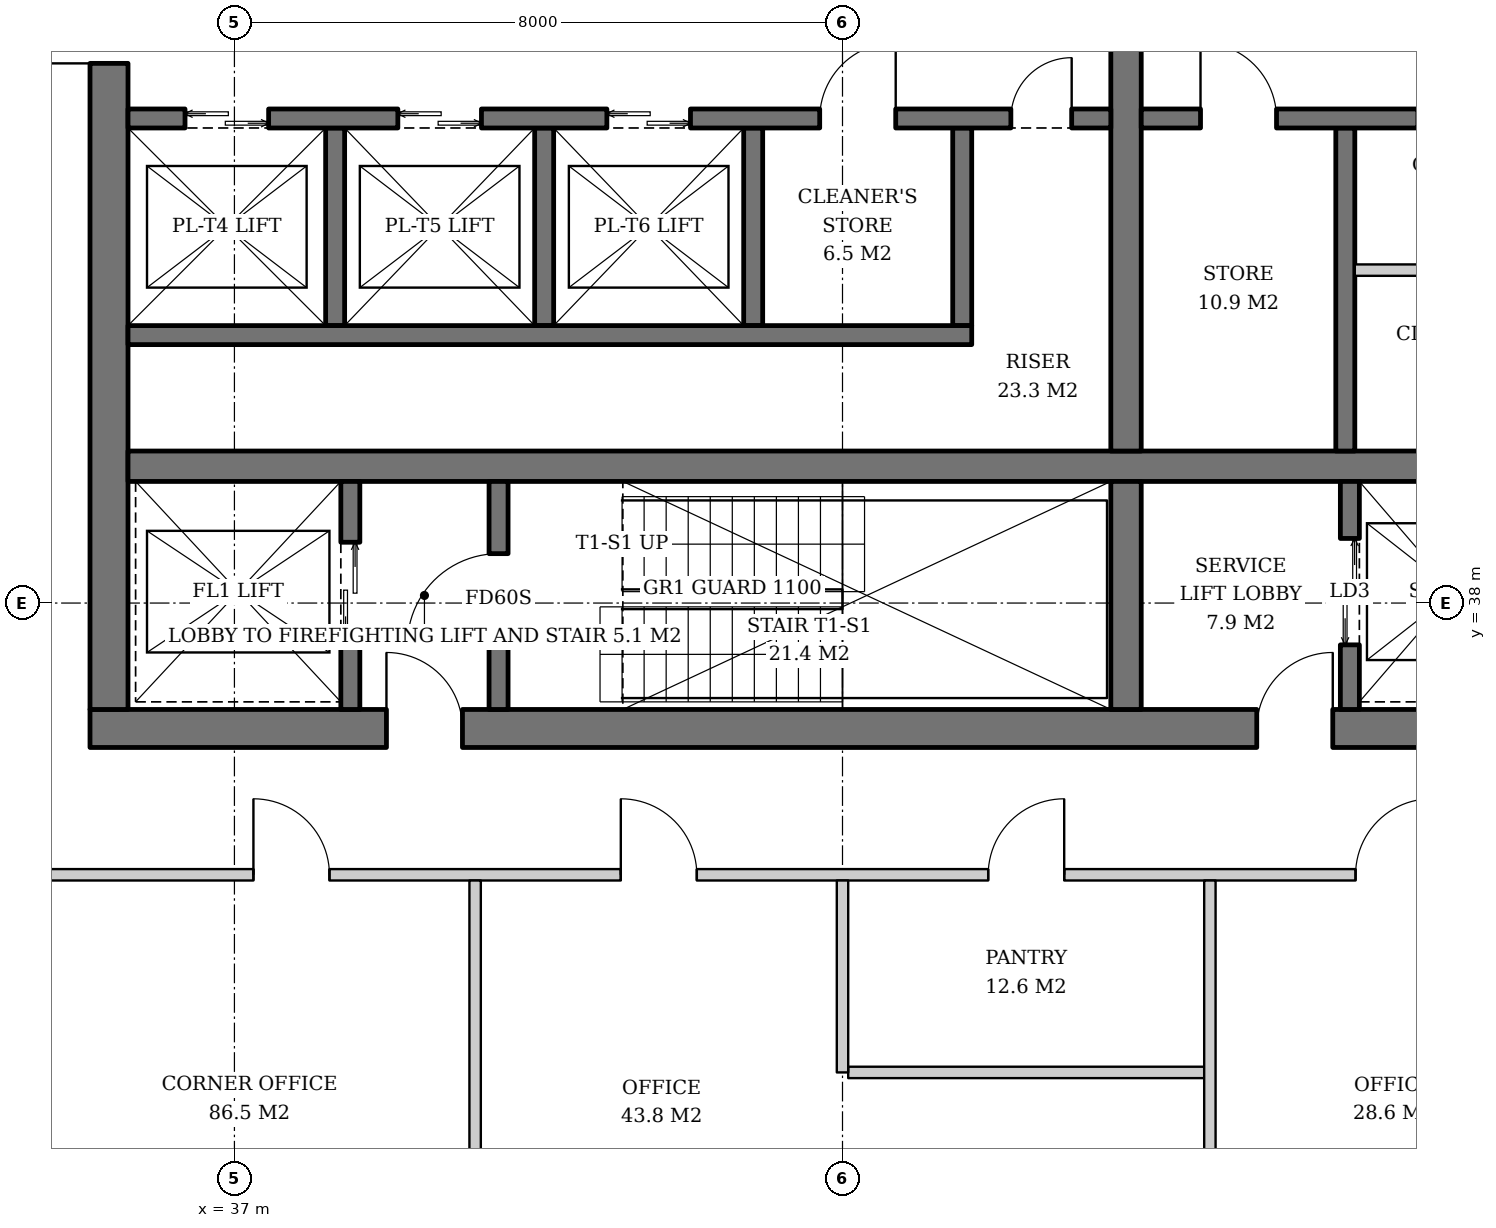
"""IFC4 building model, lengths in metres.
Left out: names, types, materials, properties, quantities, classifications, styles, units other than length and angle.
Written with IfcOpenShell. Run it as: python <this file> out.ifc"""

import sys

from ifc_helpers import new_model, si_unit, direction, frame, frame_2d, origin, place, context, subcontext, project, spatial, rectangle, extrude, element, fill, save


model = new_model("IFC4")
c1 = context("Model", 3, precision=1e-05, world=origin(), true_north=direction((0.0, 1.0)))
c2 = subcontext(c1, "Body", "Model", "MODEL_VIEW")
j1 = project(units=[si_unit("LENGTHUNIT", "METRE"), si_unit("PLANEANGLEUNIT", "RADIAN")], contexts=[c1])
p1 = place(None, origin())
s1 = spatial("IfcSite", under=j1, at=p1, CompositionType="ELEMENT")
p2 = place(p1, origin())
s2 = spatial("IfcBuilding", under=s1, at=p2, CompositionType="ELEMENT")
p3 = place(p2, frame((0.0, 0.0, 252.8)))
s3 = spatial("IfcBuildingStorey", under=s2, at=p3, CompositionType="ELEMENT", Elevation=252.8)
p4 = place(p3, frame((35.1, 36.35, 0.0), z_axis=(0.0, 0.0, 1.0), x_axis=(1.0, 0.0, 0.0)))
e1 = element("IfcWall", 1, at=p4, inside=s3, PredefinedType="SHEAR", context=c2, shape_type="SweptSolid", body=[
    extrude(rectangle(XDim=19.8, YDim=0.5, at=frame_2d((9.9, 0.0))), origin(), (0.0, 0.0, 1.0), 3.8),
])
p5 = place(p4, frame((3.9, 0.0, 0.0)))
e2 = element("IfcOpeningElement", 2, at=p5, cuts=e1, PredefinedType="OPENING", context=c2, shape_type="SweptSolid", body=[
    extrude(rectangle(XDim=1.0, YDim=2.1, at=frame_2d((0.5, 1.05))), frame((0.0, 0.26, 0.0), z_axis=(0.0, -1.0, 0.0), x_axis=(1.0, 0.0, 0.0)), (0.0, 0.0, 1.0), 0.52),
])
p6 = place(p4, frame((15.35, 0.0, 0.0)))
e3 = element("IfcOpeningElement", 3, at=p6, cuts=e1, PredefinedType="OPENING", context=c2, shape_type="SweptSolid", body=[
    extrude(rectangle(XDim=1.0, YDim=2.1, at=frame_2d((0.5, 1.05))), frame((0.0, 0.26, 0.0), z_axis=(0.0, -1.0, 0.0), x_axis=(1.0, 0.0, 0.0)), (0.0, 0.0, 1.0), 0.52),
])
p7 = place(p3, frame((35.35, 36.6, 0.0), z_axis=(0.0, 0.0, 1.0), x_axis=(0.0, 1.0, 0.0)))
e4 = element("IfcWall", 4, at=p7, inside=s3, PredefinedType="SHEAR", context=c2, shape_type="SweptSolid", body=[
    extrude(rectangle(XDim=18.8, YDim=0.5, at=frame_2d((9.4, 0.0))), origin(), (0.0, 0.0, 1.0), 3.8),
])
p8 = place(p7, frame((8.5, 0.0, 0.0)))
e5 = element("IfcOpeningElement", 5, at=p8, cuts=e4, PredefinedType="OPENING", context=c2, shape_type="SweptSolid", body=[
    extrude(rectangle(XDim=1.8, YDim=2.4, at=frame_2d((0.9, 1.2))), frame((0.0, 0.26, 0.0), z_axis=(0.0, -1.0, 0.0), x_axis=(1.0, 0.0, 0.0)), (0.0, 0.0, 1.0), 0.52),
])
p9 = place(p3, frame((35.6, 39.8, 0.0), z_axis=(0.0, 0.0, 1.0), x_axis=(1.0, 0.0, 0.0)))
e6 = element("IfcWall", 6, at=p9, inside=s3, PredefinedType="SHEAR", context=c2, shape_type="SweptSolid", body=[
    extrude(rectangle(XDim=18.8, YDim=0.4, at=frame_2d((9.4, 0.0))), origin(), (0.0, 0.0, 1.0), 3.8),
])
p10 = place(p3, frame((48.73, 36.6, 0.0), z_axis=(0.0, 0.0, 1.0), x_axis=(0.0, 1.0, 0.0)))
e7 = element("IfcWall", 7, at=p10, inside=s3, PredefinedType="SHEAR", context=c2, shape_type="SweptSolid", body=[
    extrude(rectangle(XDim=3.0, YDim=0.4, at=frame_2d((1.5, 0.0))), origin(), (0.0, 0.0, 1.0), 3.8),
])
p11 = place(p3, frame((48.73, 40.0, 0.0), z_axis=(0.0, 0.0, 1.0), x_axis=(0.0, 1.0, 0.0)))
e8 = element("IfcWall", 8, at=p11, inside=s3, PredefinedType="SHEAR", context=c2, shape_type="SweptSolid", body=[
    extrude(rectangle(XDim=12.0, YDim=0.4, at=frame_2d((6.0, 0.0))), origin(), (0.0, 0.0, 1.0), 3.8),
])
p12 = place(p3, frame((38.525, 36.6, 0.0), z_axis=(0.0, 0.0, 1.0), x_axis=(0.0, 1.0, 0.0)))
e9 = element("IfcWall", 9, at=p12, inside=s3, PredefinedType="SHEAR", context=c2, shape_type="SweptSolid", body=[
    extrude(rectangle(XDim=3.0, YDim=0.25, at=frame_2d((1.5, 0.0))), origin(), (0.0, 0.0, 1.0), 3.8),
])
p13 = place(p12, frame((0.9, 0.0, 0.0)))
e10 = element("IfcOpeningElement", 10, at=p13, cuts=e9, PredefinedType="OPENING", context=c2, shape_type="SweptSolid", body=[
    extrude(rectangle(XDim=1.3, YDim=2.2, at=frame_2d((0.65, 1.1))), frame((0.0, 0.135, 0.0), z_axis=(0.0, -1.0, 0.0), x_axis=(1.0, 0.0, 0.0)), (0.0, 0.0, 1.0), 0.27),
])
p14 = place(p3, frame((40.475, 36.6, 0.0), z_axis=(0.0, 0.0, 1.0), x_axis=(0.0, 1.0, 0.0)))
e11 = element("IfcWall", 11, at=p14, inside=s3, PredefinedType="SHEAR", context=c2, shape_type="SweptSolid", body=[
    extrude(rectangle(XDim=3.0, YDim=0.25, at=frame_2d((1.5, 0.0))), origin(), (0.0, 0.0, 1.0), 3.8),
])
p15 = place(p14, frame((0.85, 0.0, 0.0)))
e12 = element("IfcOpeningElement", 12, at=p15, cuts=e11, PredefinedType="OPENING", context=c2, shape_type="SweptSolid", body=[
    extrude(rectangle(XDim=1.2, YDim=2.1, at=frame_2d((0.6, 1.05))), frame((0.0, 0.135, 0.0), z_axis=(0.0, -1.0, 0.0), x_axis=(1.0, 0.0, 0.0)), (0.0, 0.0, 1.0), 0.27),
])
p16 = place(p3, frame((51.675, 36.6, 0.0), z_axis=(0.0, 0.0, 1.0), x_axis=(0.0, 1.0, 0.0)))
e13 = element("IfcWall", 13, at=p16, inside=s3, PredefinedType="SHEAR", context=c2, shape_type="SweptSolid", body=[
    extrude(rectangle(XDim=3.0, YDim=0.25, at=frame_2d((1.5, 0.0))), origin(), (0.0, 0.0, 1.0), 3.8),
])
p17 = place(p16, frame((0.85, 0.0, 0.0)))
e14 = element("IfcOpeningElement", 14, at=p17, cuts=e13, PredefinedType="OPENING", context=c2, shape_type="SweptSolid", body=[
    extrude(rectangle(XDim=1.4, YDim=2.4, at=frame_2d((0.7, 1.2))), frame((0.0, 0.135, 0.0), z_axis=(0.0, -1.0, 0.0), x_axis=(1.0, 0.0, 0.0)), (0.0, 0.0, 1.0), 0.27),
])
for number, where, z_axis, x_axis in (
    (15, (38.325, 44.25, 0.0), (0.0, 0.0, 1.0), (0.0, -1.0, 0.0)),
    (16, (41.075, 44.25, 0.0), (0.0, 0.0, 1.0), (0.0, -1.0, 0.0)),
    (17, (43.825, 44.25, 0.0), (0.0, 0.0, 1.0), (0.0, -1.0, 0.0)),
    (18, (46.575, 44.25, 0.0), (0.0, 0.0, 1.0), (0.0, -1.0, 0.0)),
):
    element("IfcWall", number, at=place(p3, frame(where, z_axis=z_axis, x_axis=x_axis)), inside=s3, PredefinedType="SHEAR", context=c2, shape_type="SweptSolid", body=[
        extrude(rectangle(XDim=2.6, YDim=0.25, at=frame_2d((1.3, 0.0))), origin(), (0.0, 0.0, 1.0), 3.8),
    ])
p18 = place(p3, frame((35.6, 41.525, 0.0), z_axis=(0.0, 0.0, 1.0), x_axis=(1.0, 0.0, 0.0)))
e19 = element("IfcWall", 19, at=p18, inside=s3, PredefinedType="SHEAR", context=c2, shape_type="SweptSolid", body=[
    extrude(rectangle(XDim=11.1, YDim=0.25, at=frame_2d((5.55, 0.0))), origin(), (0.0, 0.0, 1.0), 3.8),
])
p19 = place(p3, frame((35.6, 44.375, 0.0), z_axis=(0.0, 0.0, 1.0), x_axis=(1.0, 0.0, 0.0)))
e20 = element("IfcWall", 20, at=p19, inside=s3, PredefinedType="SHEAR", context=c2, shape_type="SweptSolid", body=[
    extrude(rectangle(XDim=12.93, YDim=0.25, at=frame_2d((6.465, 0.0))), origin(), (0.0, 0.0, 1.0), 3.8),
])
p20 = place(p19, frame((0.75, 0.0, 0.0)))
e21 = element("IfcOpeningElement", 21, at=p20, cuts=e20, PredefinedType="OPENING", context=c2, shape_type="SweptSolid", body=[
    extrude(rectangle(XDim=1.1, YDim=2.2, at=frame_2d((0.55, 1.1))), frame((0.0, 0.135, 0.0), z_axis=(0.0, -1.0, 0.0), x_axis=(1.0, 0.0, 0.0)), (0.0, 0.0, 1.0), 0.27),
])
p21 = place(p19, frame((3.55, 0.0, 0.0)))
e22 = element("IfcOpeningElement", 22, at=p21, cuts=e20, PredefinedType="OPENING", context=c2, shape_type="SweptSolid", body=[
    extrude(rectangle(XDim=1.1, YDim=2.2, at=frame_2d((0.55, 1.1))), frame((0.0, 0.135, 0.0), z_axis=(0.0, -1.0, 0.0), x_axis=(1.0, 0.0, 0.0)), (0.0, 0.0, 1.0), 0.27),
])
p22 = place(p19, frame((6.3, 0.0, 0.0)))
e23 = element("IfcOpeningElement", 23, at=p22, cuts=e20, PredefinedType="OPENING", context=c2, shape_type="SweptSolid", body=[
    extrude(rectangle(XDim=1.1, YDim=2.2, at=frame_2d((0.55, 1.1))), frame((0.0, 0.135, 0.0), z_axis=(0.0, -1.0, 0.0), x_axis=(1.0, 0.0, 0.0)), (0.0, 0.0, 1.0), 0.27),
])
p23 = place(p19, frame((9.1, 0.0, 0.0)))
e24 = element("IfcOpeningElement", 24, at=p23, cuts=e20, PredefinedType="OPENING", context=c2, shape_type="SweptSolid", body=[
    extrude(rectangle(XDim=1.0, YDim=2.1, at=frame_2d((0.5, 1.05))), frame((0.0, 0.135, 0.0), z_axis=(0.0, -1.0, 0.0), x_axis=(1.0, 0.0, 0.0)), (0.0, 0.0, 1.0), 0.27),
])
p24 = place(p19, frame((11.615, 0.0, 0.0)))
e25 = element("IfcOpeningElement", 25, at=p24, cuts=e20, PredefinedType="OPENING", context=c2, shape_type="SweptSolid", body=[
    extrude(rectangle(XDim=0.8, YDim=2.0, at=frame_2d((0.4, 1.0))), frame((0.0, 0.135, 0.0), z_axis=(0.0, -1.0, 0.0), x_axis=(1.0, 0.0, 0.0)), (0.0, 0.0, 1.0), 0.27),
])
p25 = place(p3, frame((51.615, 44.25, 0.0), z_axis=(0.0, 0.0, 1.0), x_axis=(0.0, -1.0, 0.0)))
e26 = element("IfcWall", 26, at=p25, inside=s3, PredefinedType="SHEAR", context=c2, shape_type="SweptSolid", body=[
    extrude(rectangle(XDim=4.25, YDim=0.25, at=frame_2d((2.125, 0.0))), origin(), (0.0, 0.0, 1.0), 3.8),
])
p26 = place(p3, frame((48.93, 44.375, 0.0), z_axis=(0.0, 0.0, 1.0), x_axis=(1.0, 0.0, 0.0)))
e27 = element("IfcWall", 27, at=p26, inside=s3, PredefinedType="SHEAR", context=c2, shape_type="SweptSolid", body=[
    extrude(rectangle(XDim=5.47, YDim=0.25, at=frame_2d((2.735, 0.0))), origin(), (0.0, 0.0, 1.0), 3.8),
])
p27 = place(p26, frame((0.78, 0.0, 0.0)))
e28 = element("IfcOpeningElement", 28, at=p27, cuts=e27, PredefinedType="OPENING", context=c2, shape_type="SweptSolid", body=[
    extrude(rectangle(XDim=1.0, YDim=2.1, at=frame_2d((0.5, 1.05))), frame((0.0, 0.135, 0.0), z_axis=(0.0, -1.0, 0.0), x_axis=(1.0, 0.0, 0.0)), (0.0, 0.0, 1.0), 0.27),
])
p28 = place(p26, frame((3.64, 0.0, 0.0)))
e29 = element("IfcOpeningElement", 29, at=p28, cuts=e27, PredefinedType="OPENING", context=c2, shape_type="SweptSolid", body=[
    extrude(rectangle(XDim=1.0, YDim=2.1, at=frame_2d((0.5, 1.05))), frame((0.0, 0.135, 0.0), z_axis=(0.0, -1.0, 0.0), x_axis=(1.0, 0.0, 0.0)), (0.0, 0.0, 1.0), 0.27),
])
p29 = place(p3, frame((51.74, 42.38, 0.0), z_axis=(0.0, 0.0, 1.0), x_axis=(1.0, 0.0, 0.0)))
e30 = element("IfcWall", 30, at=p29, inside=s3, PredefinedType="SOLIDWALL", context=c2, shape_type="SweptSolid", body=[
    extrude(rectangle(XDim=2.66, YDim=0.15, at=frame_2d((1.33, 0.0))), origin(), (0.0, 0.0, 1.0), 3.62),
])
p30 = place(p29, frame((0.83, 0.0, 0.0)))
e31 = element("IfcOpeningElement", 31, at=p30, cuts=e30, PredefinedType="OPENING", context=c2, shape_type="SweptSolid", body=[
    extrude(rectangle(XDim=1.0, YDim=2.1, at=frame_2d((0.5, 1.05))), frame((0.0, 0.085, 0.0), z_axis=(0.0, -1.0, 0.0), x_axis=(1.0, 0.0, 0.0)), (0.0, 0.0, 1.0), 0.17),
])
p31 = place(p3, frame((45.075, 31.825, 0.0), z_axis=(0.0, 0.0, 1.0), x_axis=(1.0, 0.0, 0.0)))
e32 = element("IfcWall", 32, at=p31, inside=s3, PredefinedType="PARTITIONING", context=c2, shape_type="SweptSolid", body=[
    extrude(rectangle(XDim=4.683, YDim=0.15, at=frame_2d((2.342, 0.0))), origin(), (0.0, 0.0, 1.0), 3.12),
])
p32 = place(p3, frame((32.756, 34.425, 0.0), z_axis=(0.0, 0.0, 1.0), x_axis=(1.0, 0.0, 0.0)))
e33 = element("IfcWall", 33, at=p32, inside=s3, PredefinedType="PARTITIONING", context=c2, shape_type="SweptSolid", body=[
    extrude(rectangle(XDim=24.489, YDim=0.15, at=frame_2d((12.244, 0.0))), origin(), (0.0, 0.0, 1.0), 3.02),
])
p33 = place(p32, frame((4.494, 0.0, 0.0)))
e34 = element("IfcOpeningElement", 34, at=p33, cuts=e33, PredefinedType="OPENING", context=c2, shape_type="SweptSolid", body=[
    extrude(rectangle(XDim=1.0, YDim=2.1, at=frame_2d((0.5, 1.05))), frame((0.0, 0.085, 0.0), z_axis=(0.0, -1.0, 0.0), x_axis=(1.0, 0.0, 0.0)), (0.0, 0.0, 1.0), 0.17),
])
p34 = place(p32, frame((9.328, 0.0, 0.0)))
e35 = element("IfcOpeningElement", 35, at=p34, cuts=e33, PredefinedType="OPENING", context=c2, shape_type="SweptSolid", body=[
    extrude(rectangle(XDim=1.0, YDim=2.1, at=frame_2d((0.5, 1.05))), frame((0.0, 0.085, 0.0), z_axis=(0.0, -1.0, 0.0), x_axis=(1.0, 0.0, 0.0)), (0.0, 0.0, 1.0), 0.17),
])
p35 = place(p32, frame((14.161, 0.0, 0.0)))
e36 = element("IfcOpeningElement", 36, at=p35, cuts=e33, PredefinedType="OPENING", context=c2, shape_type="SweptSolid", body=[
    extrude(rectangle(XDim=1.0, YDim=2.1, at=frame_2d((0.5, 1.05))), frame((0.0, 0.085, 0.0), z_axis=(0.0, -1.0, 0.0), x_axis=(1.0, 0.0, 0.0)), (0.0, 0.0, 1.0), 0.17),
])
p36 = place(p32, frame((18.994, 0.0, 0.0)))
e37 = element("IfcOpeningElement", 37, at=p36, cuts=e33, PredefinedType="OPENING", context=c2, shape_type="SweptSolid", body=[
    extrude(rectangle(XDim=1.0, YDim=2.1, at=frame_2d((0.5, 1.05))), frame((0.0, 0.085, 0.0), z_axis=(0.0, -1.0, 0.0), x_axis=(1.0, 0.0, 0.0)), (0.0, 0.0, 1.0), 0.17),
])
p37 = place(p3, frame((40.167, 34.35, 0.0), z_axis=(0.0, 0.0, 1.0), x_axis=(0.0, -1.0, 0.0)))
e38 = element("IfcWall", 38, at=p37, inside=s3, PredefinedType="PARTITIONING", context=c2, shape_type="SweptSolid", body=[
    extrude(rectangle(XDim=4.609, YDim=0.15, at=frame_2d((2.305, 0.0))), origin(), (0.0, 0.0, 1.0), 3.62),
])
p38 = place(p3, frame((45.0, 34.35, 0.0), z_axis=(0.0, 0.0, 1.0), x_axis=(0.0, -1.0, 0.0)))
e39 = element("IfcWall", 39, at=p38, inside=s3, PredefinedType="PARTITIONING", context=c2, shape_type="SweptSolid", body=[
    extrude(rectangle(XDim=2.525, YDim=0.15, at=frame_2d((1.263, 0.0))), origin(), (0.0, 0.0, 1.0), 3.62),
])
p39 = place(p3, frame((49.833, 34.35, 0.0), z_axis=(0.0, 0.0, 1.0), x_axis=(0.0, -1.0, 0.0)))
e40 = element("IfcWall", 40, at=p39, inside=s3, PredefinedType="PARTITIONING", context=c2, shape_type="SweptSolid", body=[
    extrude(rectangle(XDim=4.609, YDim=0.15, at=frame_2d((2.305, 0.0))), origin(), (0.0, 0.0, 1.0), 3.62),
])
p40 = place(p13, origin())
e41 = element("IfcDoor", 41, at=p40, inside=s3, OperationType="DOUBLE_DOOR_SLIDING", PredefinedType="DOOR", context=c2, shape_type="SweptSolid", body=[
    extrude(rectangle(XDim=1.3, YDim=2.2, at=frame_2d((0.65, 1.1))), frame((0.0, 0.025, 0.0), z_axis=(0.0, -1.0, 0.0), x_axis=(1.0, 0.0, 0.0)), (0.0, 0.0, 1.0), 0.05),
])
fill(e10, e41)
p41 = place(p15, origin())
e42 = element("IfcDoor", 42, at=p41, inside=s3, OperationType="SINGLE_SWING_LEFT", PredefinedType="DOOR", context=c2, shape_type="SweptSolid", body=[
    extrude(rectangle(XDim=1.2, YDim=2.1, at=frame_2d((0.6, 1.05))), frame((0.0, 0.025, 0.0), z_axis=(0.0, -1.0, 0.0), x_axis=(1.0, 0.0, 0.0)), (0.0, 0.0, 1.0), 0.05),
])
fill(e12, e42)
p42 = place(p17, origin())
e43 = element("IfcDoor", 43, at=p42, inside=s3, OperationType="DOUBLE_DOOR_SLIDING", PredefinedType="DOOR", context=c2, shape_type="SweptSolid", body=[
    extrude(rectangle(XDim=1.4, YDim=2.4, at=frame_2d((0.7, 1.2))), frame((0.0, 0.025, 0.0), z_axis=(0.0, -1.0, 0.0), x_axis=(1.0, 0.0, 0.0)), (0.0, 0.0, 1.0), 0.05),
])
fill(e14, e43)
p43 = place(p20, origin())
e44 = element("IfcDoor", 44, at=p43, inside=s3, OperationType="DOUBLE_DOOR_SLIDING", PredefinedType="DOOR", context=c2, shape_type="SweptSolid", body=[
    extrude(rectangle(XDim=1.1, YDim=2.2, at=frame_2d((0.55, 1.1))), frame((0.0, 0.025, 0.0), z_axis=(0.0, -1.0, 0.0), x_axis=(1.0, 0.0, 0.0)), (0.0, 0.0, 1.0), 0.05),
])
fill(e21, e44)
p44 = place(p21, origin())
e45 = element("IfcDoor", 45, at=p44, inside=s3, OperationType="DOUBLE_DOOR_SLIDING", PredefinedType="DOOR", context=c2, shape_type="SweptSolid", body=[
    extrude(rectangle(XDim=1.1, YDim=2.2, at=frame_2d((0.55, 1.1))), frame((0.0, 0.025, 0.0), z_axis=(0.0, -1.0, 0.0), x_axis=(1.0, 0.0, 0.0)), (0.0, 0.0, 1.0), 0.05),
])
fill(e22, e45)
p45 = place(p22, origin())
e46 = element("IfcDoor", 46, at=p45, inside=s3, OperationType="DOUBLE_DOOR_SLIDING", PredefinedType="DOOR", context=c2, shape_type="SweptSolid", body=[
    extrude(rectangle(XDim=1.1, YDim=2.2, at=frame_2d((0.55, 1.1))), frame((0.0, 0.025, 0.0), z_axis=(0.0, -1.0, 0.0), x_axis=(1.0, 0.0, 0.0)), (0.0, 0.0, 1.0), 0.05),
])
fill(e23, e46)
p46 = place(p23, origin())
e47 = element("IfcDoor", 47, at=p46, inside=s3, OperationType="SINGLE_SWING_RIGHT", PredefinedType="DOOR", context=c2, shape_type="SweptSolid", body=[
    extrude(rectangle(XDim=1.0, YDim=2.1, at=frame_2d((0.5, 1.05))), frame((0.0, 0.025, 0.0), z_axis=(0.0, -1.0, 0.0), x_axis=(1.0, 0.0, 0.0)), (0.0, 0.0, 1.0), 0.05),
])
fill(e24, e47)
p47 = place(p24, origin())
e48 = element("IfcDoor", 48, at=p47, inside=s3, OperationType="SINGLE_SWING_RIGHT", PredefinedType="DOOR", context=c2, shape_type="SweptSolid", body=[
    extrude(rectangle(XDim=0.8, YDim=2.0, at=frame_2d((0.4, 1.0))), frame((0.0, 0.025, 0.0), z_axis=(0.0, -1.0, 0.0), x_axis=(1.0, 0.0, 0.0)), (0.0, 0.0, 1.0), 0.05),
])
fill(e25, e48)
p48 = place(p27, origin())
e49 = element("IfcDoor", 49, at=p48, inside=s3, OperationType="SINGLE_SWING_LEFT", PredefinedType="DOOR", context=c2, shape_type="SweptSolid", body=[
    extrude(rectangle(XDim=1.0, YDim=2.1, at=frame_2d((0.5, 1.05))), frame((0.0, 0.025, 0.0), z_axis=(0.0, -1.0, 0.0), x_axis=(1.0, 0.0, 0.0)), (0.0, 0.0, 1.0), 0.05),
])
fill(e28, e49)
p49 = place(p5, origin())
e50 = element("IfcDoor", 50, at=p49, inside=s3, OperationType="SINGLE_SWING_LEFT", PredefinedType="DOOR", context=c2, shape_type="SweptSolid", body=[
    extrude(rectangle(XDim=1.0, YDim=2.1, at=frame_2d((0.5, 1.05))), frame((0.0, 0.025, 0.0), z_axis=(0.0, -1.0, 0.0), x_axis=(1.0, 0.0, 0.0)), (0.0, 0.0, 1.0), 0.05),
])
fill(e2, e50)
p50 = place(p8, origin())
e51 = element("IfcDoor", 51, at=p50, inside=s3, OperationType="DOUBLE_DOOR_SINGLE_SWING", PredefinedType="DOOR", context=c2, shape_type="SweptSolid", body=[
    extrude(rectangle(XDim=1.8, YDim=2.4, at=frame_2d((0.9, 1.2))), frame((0.0, 0.025, 0.0), z_axis=(0.0, -1.0, 0.0), x_axis=(1.0, 0.0, 0.0)), (0.0, 0.0, 1.0), 0.05),
])
fill(e5, e51)
p51 = place(p6, origin())
e52 = element("IfcDoor", 52, at=p51, inside=s3, OperationType="SINGLE_SWING_RIGHT", PredefinedType="DOOR", context=c2, shape_type="SweptSolid", body=[
    extrude(rectangle(XDim=1.0, YDim=2.1, at=frame_2d((0.5, 1.05))), frame((0.0, 0.025, 0.0), z_axis=(0.0, -1.0, 0.0), x_axis=(1.0, 0.0, 0.0)), (0.0, 0.0, 1.0), 0.05),
])
fill(e3, e52)
p52 = place(p33, origin())
e53 = element("IfcDoor", 53, at=p52, inside=s3, OperationType="SINGLE_SWING_LEFT", PredefinedType="DOOR", context=c2, shape_type="SweptSolid", body=[
    extrude(rectangle(XDim=1.0, YDim=2.1, at=frame_2d((0.5, 1.05))), frame((0.0, 0.025, 0.0), z_axis=(0.0, -1.0, 0.0), x_axis=(1.0, 0.0, 0.0)), (0.0, 0.0, 1.0), 0.05),
])
fill(e34, e53)
p53 = place(p34, origin())
e54 = element("IfcDoor", 54, at=p53, inside=s3, OperationType="SINGLE_SWING_LEFT", PredefinedType="DOOR", context=c2, shape_type="SweptSolid", body=[
    extrude(rectangle(XDim=1.0, YDim=2.1, at=frame_2d((0.5, 1.05))), frame((0.0, 0.025, 0.0), z_axis=(0.0, -1.0, 0.0), x_axis=(1.0, 0.0, 0.0)), (0.0, 0.0, 1.0), 0.05),
])
fill(e35, e54)
p54 = place(p35, origin())
e55 = element("IfcDoor", 55, at=p54, inside=s3, OperationType="SINGLE_SWING_RIGHT", PredefinedType="DOOR", context=c2, shape_type="SweptSolid", body=[
    extrude(rectangle(XDim=1.0, YDim=2.1, at=frame_2d((0.5, 1.05))), frame((0.0, 0.025, 0.0), z_axis=(0.0, -1.0, 0.0), x_axis=(1.0, 0.0, 0.0)), (0.0, 0.0, 1.0), 0.05),
])
fill(e36, e55)
p55 = place(p36, origin())
e56 = element("IfcDoor", 56, at=p55, inside=s3, OperationType="SINGLE_SWING_RIGHT", PredefinedType="DOOR", context=c2, shape_type="SweptSolid", body=[
    extrude(rectangle(XDim=1.0, YDim=2.1, at=frame_2d((0.5, 1.05))), frame((0.0, 0.025, 0.0), z_axis=(0.0, -1.0, 0.0), x_axis=(1.0, 0.0, 0.0)), (0.0, 0.0, 1.0), 0.05),
])
fill(e37, e56)
save(model, sys.argv[1])
